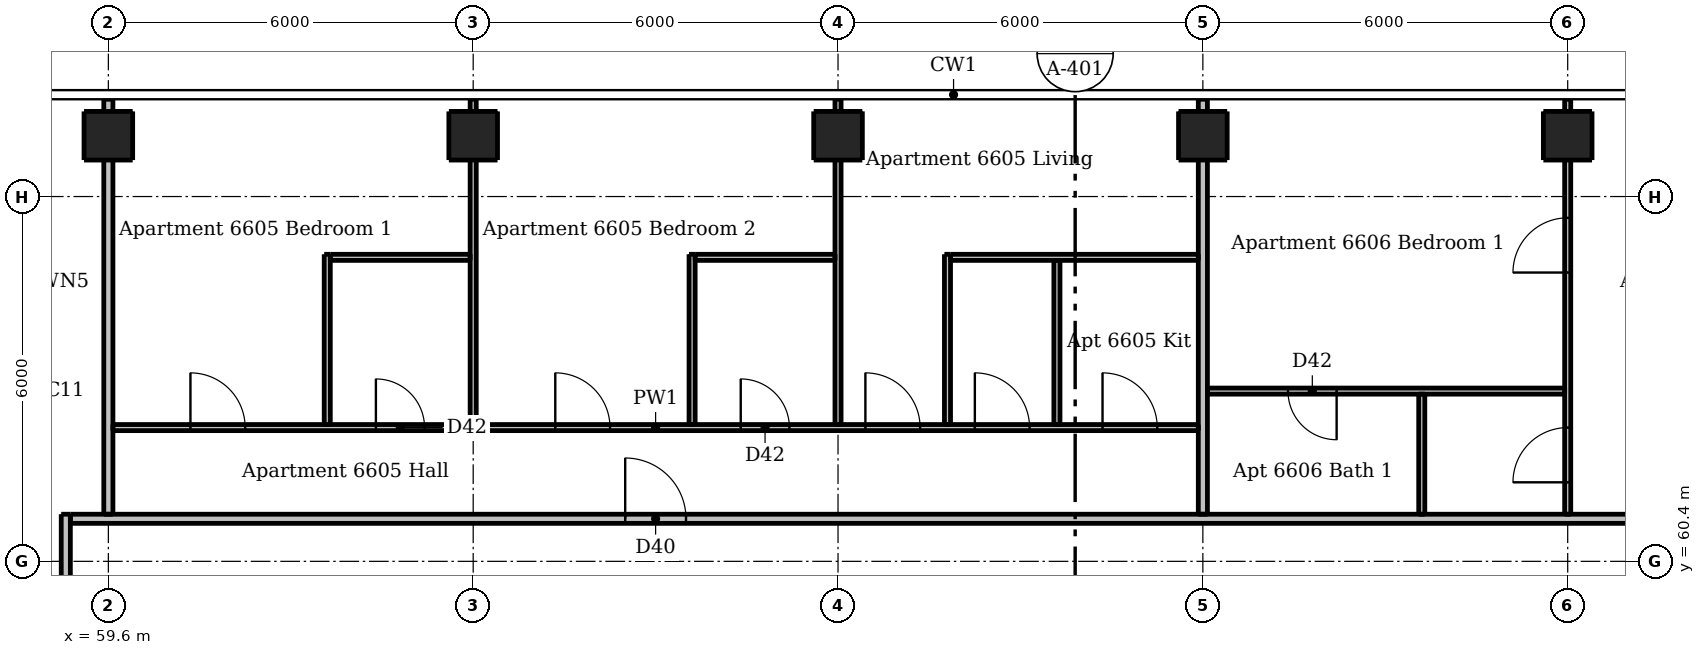
"""IFC4 building model, lengths in metres.
Left out: names, types, materials, properties, quantities, classifications, styles, units other than length and angle.
Written with IfcOpenShell. Run it as: python <this file> out.ifc"""

import sys

from ifc_helpers import new_model, si_unit, direction, frame, frame_2d, origin, origin_2d, place, context, subcontext, project, spatial, rectangle, extrude, element, fill, save


model = new_model("IFC4")
c1 = context("Model", 3, precision=1e-05, world=origin(), true_north=direction((0.0, 1.0)))
c2 = subcontext(c1, "Body", "Model", "MODEL_VIEW")
j1 = project(units=[si_unit("LENGTHUNIT", "METRE"), si_unit("PLANEANGLEUNIT", "RADIAN")], contexts=[c1])
p1 = place(None, origin())
s1 = spatial("IfcSite", under=j1, at=p1, CompositionType="ELEMENT")
p2 = place(p1, origin())
s2 = spatial("IfcBuilding", under=s1, at=p2, CompositionType="ELEMENT")
p3 = place(p2, frame((0.0, 0.0, 248.8)))
s3 = spatial("IfcBuildingStorey", under=s2, at=p3, CompositionType="ELEMENT", Elevation=248.8)
for number, where, z_axis, x_axis in (
    (1, (59.6, 67.4, 0.0), (0.0, 0.0, 1.0), (1.0, 0.0, 0.0)),
    (2, (65.6, 67.4, 0.0), (0.0, 0.0, 1.0), (1.0, 0.0, 0.0)),
    (3, (71.6, 67.4, 0.0), (0.0, 0.0, 1.0), (1.0, 0.0, 0.0)),
    (4, (77.6, 67.4, 0.0), (0.0, 0.0, 1.0), (1.0, 0.0, 0.0)),
    (5, (83.6, 67.4, 0.0), (0.0, 0.0, 1.0), (1.0, 0.0, 0.0)),
):
    element("IfcColumn", number, at=place(p3, frame(where, z_axis=z_axis, x_axis=x_axis)), inside=s3, PredefinedType="COLUMN", context=c2, shape_type="SweptSolid", body=[
        extrude(rectangle(XDim=0.8, YDim=0.8, at=origin_2d()), origin(), (0.0, 0.0, 1.0), 3.05),
    ])
p4 = place(p3, frame((63.2, 62.65, 0.0), z_axis=(0.0, 0.0, 1.0), x_axis=(0.0, 1.0, 0.0)))
e6 = element("IfcWall", 6, at=p4, inside=s3, PredefinedType="PARTITIONING", context=c2, shape_type="SweptSolid", body=[
    extrude(rectangle(XDim=2.8, YDim=0.1, at=frame_2d((1.4, 0.0))), origin(), (0.0, 0.0, 1.0), 3.05),
])
p5 = place(p3, frame((65.6, 62.65, 0.0), z_axis=(0.0, 0.0, 1.0), x_axis=(0.0, 1.0, 0.0)))
e7 = element("IfcWall", 7, at=p5, inside=s3, PredefinedType="PARTITIONING", context=c2, shape_type="SweptSolid", body=[
    extrude(rectangle(XDim=5.35, YDim=0.1, at=frame_2d((2.675, 0.0))), origin(), (0.0, 0.0, 1.0), 2.516),
])
p6 = place(p3, frame((69.2, 62.65, 0.0), z_axis=(0.0, 0.0, 1.0), x_axis=(0.0, 1.0, 0.0)))
e8 = element("IfcWall", 8, at=p6, inside=s3, PredefinedType="PARTITIONING", context=c2, shape_type="SweptSolid", body=[
    extrude(rectangle(XDim=2.8, YDim=0.1, at=frame_2d((1.4, 0.0))), origin(), (0.0, 0.0, 1.0), 3.05),
])
p7 = place(p3, frame((71.6, 62.65, 0.0), z_axis=(0.0, 0.0, 1.0), x_axis=(0.0, 1.0, 0.0)))
e9 = element("IfcWall", 9, at=p7, inside=s3, PredefinedType="PARTITIONING", context=c2, shape_type="SweptSolid", body=[
    extrude(rectangle(XDim=5.35, YDim=0.1, at=frame_2d((2.675, 0.0))), origin(), (0.0, 0.0, 1.0), 2.516),
])
p8 = place(p3, frame((73.4, 62.65, 0.0), z_axis=(0.0, 0.0, 1.0), x_axis=(0.0, 1.0, 0.0)))
e10 = element("IfcWall", 10, at=p8, inside=s3, PredefinedType="PARTITIONING", context=c2, shape_type="SweptSolid", body=[
    extrude(rectangle(XDim=2.8, YDim=0.1, at=frame_2d((1.4, 0.0))), origin(), (0.0, 0.0, 1.0), 3.05),
])
p9 = place(p3, frame((75.2, 62.65, 0.0), z_axis=(0.0, 0.0, 1.0), x_axis=(0.0, 1.0, 0.0)))
e11 = element("IfcWall", 11, at=p9, inside=s3, PredefinedType="PARTITIONING", context=c2, shape_type="SweptSolid", body=[
    extrude(rectangle(XDim=2.7, YDim=0.1, at=frame_2d((1.35, 0.0))), origin(), (0.0, 0.0, 1.0), 3.05),
])
p10 = place(p3, frame((81.2, 61.175, 0.0), z_axis=(0.0, 0.0, 1.0), x_axis=(0.0, 1.0, 0.0)))
e12 = element("IfcWall", 12, at=p10, inside=s3, PredefinedType="PARTITIONING", context=c2, shape_type="SweptSolid", body=[
    extrude(rectangle(XDim=1.975, YDim=0.1, at=frame_2d((0.987, 0.0))), origin(), (0.0, 0.0, 1.0), 3.05),
])
p11 = place(p3, frame((83.6, 61.175, 0.0), z_axis=(0.0, 0.0, 1.0), x_axis=(0.0, 1.0, 0.0)))
e13 = element("IfcWall", 13, at=p11, inside=s3, PredefinedType="PARTITIONING", context=c2, shape_type="SweptSolid", body=[
    extrude(rectangle(XDim=6.825, YDim=0.1, at=frame_2d((3.413, 0.0))), origin(), (0.0, 0.0, 1.0), 2.516),
])
p12 = place(p11, frame((0.525, 0.0, 0.0)))
e14 = element("IfcOpeningElement", 14, at=p12, cuts=e13, PredefinedType="OPENING", context=c2, shape_type="SweptSolid", body=[
    extrude(rectangle(XDim=0.9, YDim=2.1, at=frame_2d((0.45, 1.05))), frame((0.0, 0.06, 0.0), z_axis=(0.0, -1.0, 0.0), x_axis=(1.0, 0.0, 0.0)), (0.0, 0.0, 1.0), 0.12),
])
p13 = place(p11, frame((3.975, 0.0, 0.0)))
e15 = element("IfcOpeningElement", 15, at=p13, cuts=e13, PredefinedType="OPENING", context=c2, shape_type="SweptSolid", body=[
    extrude(rectangle(XDim=0.9, YDim=2.1, at=frame_2d((0.45, 1.05))), frame((0.0, 0.06, 0.0), z_axis=(0.0, -1.0, 0.0), x_axis=(1.0, 0.0, 0.0)), (0.0, 0.0, 1.0), 0.12),
])
for number, where, z_axis, x_axis in (
    (16, (63.25, 65.4, 0.0), (0.0, 0.0, 1.0), (1.0, 0.0, 0.0)),
    (17, (69.25, 65.4, 0.0), (0.0, 0.0, 1.0), (1.0, 0.0, 0.0)),
):
    element("IfcWall", number, at=place(p3, frame(where, z_axis=z_axis, x_axis=x_axis)), inside=s3, PredefinedType="PARTITIONING", context=c2, shape_type="SweptSolid", body=[
        extrude(rectangle(XDim=2.3, YDim=0.1, at=frame_2d((1.15, 0.0))), origin(), (0.0, 0.0, 1.0), 3.05),
    ])
p14 = place(p3, frame((73.45, 65.4, 0.0), z_axis=(0.0, 0.0, 1.0), x_axis=(1.0, 0.0, 0.0)))
e18 = element("IfcWall", 18, at=p14, inside=s3, PredefinedType="PARTITIONING", context=c2, shape_type="SweptSolid", body=[
    extrude(rectangle(XDim=4.075, YDim=0.1, at=frame_2d((2.038, 0.0))), origin(), (0.0, 0.0, 1.0), 3.05),
])
p15 = place(p3, frame((83.55, 63.2, 0.0), z_axis=(0.0, 0.0, 1.0), x_axis=(-1.0, 0.0, 0.0)))
e19 = element("IfcWall", 19, at=p15, inside=s3, PredefinedType="PARTITIONING", context=c2, shape_type="SweptSolid", body=[
    extrude(rectangle(XDim=5.875, YDim=0.1, at=frame_2d((2.938, 0.0))), origin(), (0.0, 0.0, 1.0), 3.05),
])
p16 = place(p15, frame((3.75, 0.0, 0.0)))
e20 = element("IfcOpeningElement", 20, at=p16, cuts=e19, PredefinedType="OPENING", context=c2, shape_type="SweptSolid", body=[
    extrude(rectangle(XDim=0.8, YDim=2.1, at=frame_2d((0.4, 1.05))), frame((0.0, 0.06, 0.0), z_axis=(0.0, -1.0, 0.0), x_axis=(1.0, 0.0, 0.0)), (0.0, 0.0, 1.0), 0.12),
])
p17 = place(p3, frame((59.675, 62.6, 0.0), z_axis=(0.0, 0.0, 1.0), x_axis=(1.0, 0.0, 0.0)))
e21 = element("IfcWall", 21, at=p17, inside=s3, PredefinedType="PARTITIONING", context=c2, shape_type="SweptSolid", body=[
    extrude(rectangle(XDim=17.85, YDim=0.1, at=frame_2d((8.925, 0.0))), origin(), (0.0, 0.0, 1.0), 3.05),
])
p18 = place(p17, frame((12.375, 0.0, 0.0)))
e22 = element("IfcOpeningElement", 22, at=p18, cuts=e21, PredefinedType="OPENING", context=c2, shape_type="SweptSolid", body=[
    extrude(rectangle(XDim=0.9, YDim=2.1, at=frame_2d((0.45, 1.05))), frame((0.0, 0.06, 0.0), z_axis=(0.0, -1.0, 0.0), x_axis=(1.0, 0.0, 0.0)), (0.0, 0.0, 1.0), 0.12),
])
p19 = place(p17, frame((16.275, 0.0, 0.0)))
e23 = element("IfcOpeningElement", 23, at=p19, cuts=e21, PredefinedType="OPENING", context=c2, shape_type="SweptSolid", body=[
    extrude(rectangle(XDim=0.9, YDim=2.1, at=frame_2d((0.45, 1.05))), frame((0.0, 0.06, 0.0), z_axis=(0.0, -1.0, 0.0), x_axis=(1.0, 0.0, 0.0)), (0.0, 0.0, 1.0), 0.12),
])
p20 = place(p17, frame((14.175, 0.0, 0.0)))
e24 = element("IfcOpeningElement", 24, at=p20, cuts=e21, PredefinedType="OPENING", context=c2, shape_type="SweptSolid", body=[
    extrude(rectangle(XDim=0.9, YDim=2.1, at=frame_2d((0.45, 1.05))), frame((0.0, 0.06, 0.0), z_axis=(0.0, -1.0, 0.0), x_axis=(1.0, 0.0, 0.0)), (0.0, 0.0, 1.0), 0.12),
])
p21 = place(p17, frame((1.275, 0.0, 0.0)))
e25 = element("IfcOpeningElement", 25, at=p21, cuts=e21, PredefinedType="OPENING", context=c2, shape_type="SweptSolid", body=[
    extrude(rectangle(XDim=0.9, YDim=2.1, at=frame_2d((0.45, 1.05))), frame((0.0, 0.06, 0.0), z_axis=(0.0, -1.0, 0.0), x_axis=(1.0, 0.0, 0.0)), (0.0, 0.0, 1.0), 0.12),
])
p22 = place(p17, frame((7.275, 0.0, 0.0)))
e26 = element("IfcOpeningElement", 26, at=p22, cuts=e21, PredefinedType="OPENING", context=c2, shape_type="SweptSolid", body=[
    extrude(rectangle(XDim=0.9, YDim=2.1, at=frame_2d((0.45, 1.05))), frame((0.0, 0.06, 0.0), z_axis=(0.0, -1.0, 0.0), x_axis=(1.0, 0.0, 0.0)), (0.0, 0.0, 1.0), 0.12),
])
p23 = place(p17, frame((4.325, 0.0, 0.0)))
e27 = element("IfcOpeningElement", 27, at=p23, cuts=e21, PredefinedType="OPENING", context=c2, shape_type="SweptSolid", body=[
    extrude(rectangle(XDim=0.8, YDim=2.1, at=frame_2d((0.4, 1.05))), frame((0.0, 0.06, 0.0), z_axis=(0.0, -1.0, 0.0), x_axis=(1.0, 0.0, 0.0)), (0.0, 0.0, 1.0), 0.12),
])
p24 = place(p17, frame((10.325, 0.0, 0.0)))
e28 = element("IfcOpeningElement", 28, at=p24, cuts=e21, PredefinedType="OPENING", context=c2, shape_type="SweptSolid", body=[
    extrude(rectangle(XDim=0.8, YDim=2.1, at=frame_2d((0.4, 1.05))), frame((0.0, 0.06, 0.0), z_axis=(0.0, -1.0, 0.0), x_axis=(1.0, 0.0, 0.0)), (0.0, 0.0, 1.0), 0.12),
])
p25 = place(p3, frame((58.9, 30.325, 0.0), z_axis=(0.0, 0.0, 1.0), x_axis=(0.0, 1.0, 0.0)))
e29 = element("IfcWall", 29, at=p25, inside=s3, PredefinedType="PARTITIONING", context=c2, shape_type="SweptSolid", body=[
    extrude(rectangle(XDim=30.85, YDim=0.15, at=frame_2d((15.425, 0.0))), origin(), (0.0, 0.0, 1.0), 3.05),
])
p26 = place(p25, frame((7.375, 0.0, 0.0)))
e30 = element("IfcOpeningElement", 30, at=p26, cuts=e29, PredefinedType="OPENING", context=c2, shape_type="SweptSolid", body=[
    extrude(rectangle(XDim=1.0, YDim=2.1, at=frame_2d((0.5, 1.05))), frame((0.0, 0.085, 0.0), z_axis=(0.0, -1.0, 0.0), x_axis=(1.0, 0.0, 0.0)), (0.0, 0.0, 1.0), 0.17),
])
p27 = place(p25, frame((26.925, 0.0, 0.0)))
e31 = element("IfcOpeningElement", 31, at=p27, cuts=e29, PredefinedType="OPENING", context=c2, shape_type="SweptSolid", body=[
    extrude(rectangle(XDim=1.0, YDim=2.1, at=frame_2d((0.5, 1.05))), frame((0.0, 0.085, 0.0), z_axis=(0.0, -1.0, 0.0), x_axis=(1.0, 0.0, 0.0)), (0.0, 0.0, 1.0), 0.17),
])
p28 = place(p3, frame((59.6, 61.175, 0.0), z_axis=(0.0, 0.0, 1.0), x_axis=(0.0, 1.0, 0.0)))
e32 = element("IfcWall", 32, at=p28, inside=s3, PredefinedType="PARTITIONING", context=c2, shape_type="SweptSolid", body=[
    extrude(rectangle(XDim=6.825, YDim=0.15, at=frame_2d((3.413, 0.0))), origin(), (0.0, 0.0, 1.0), 2.51),
])
p29 = place(p3, frame((77.6, 61.175, 0.0), z_axis=(0.0, 0.0, 1.0), x_axis=(0.0, 1.0, 0.0)))
e33 = element("IfcWall", 33, at=p29, inside=s3, PredefinedType="PARTITIONING", context=c2, shape_type="SweptSolid", body=[
    extrude(rectangle(XDim=6.825, YDim=0.15, at=frame_2d((3.413, 0.0))), origin(), (0.0, 0.0, 1.0), 2.516),
])
p30 = place(p3, frame((58.975, 61.1, 0.0), z_axis=(0.0, 0.0, 1.0), x_axis=(1.0, 0.0, 0.0)))
e34 = element("IfcWall", 34, at=p30, inside=s3, PredefinedType="PARTITIONING", context=c2, shape_type="SweptSolid", body=[
    extrude(rectangle(XDim=29.25, YDim=0.15, at=frame_2d((14.625, 0.0))), origin(), (0.0, 0.0, 1.0), 3.05),
])
p31 = place(p30, frame((9.125, 0.0, 0.0)))
e35 = element("IfcOpeningElement", 35, at=p31, cuts=e34, PredefinedType="OPENING", context=c2, shape_type="SweptSolid", body=[
    extrude(rectangle(XDim=1.0, YDim=2.1, at=frame_2d((0.5, 1.05))), frame((0.0, 0.085, 0.0), z_axis=(0.0, -1.0, 0.0), x_axis=(1.0, 0.0, 0.0)), (0.0, 0.0, 1.0), 0.17),
])
p32 = place(p30, frame((26.475, 0.0, 0.0)))
e36 = element("IfcOpeningElement", 36, at=p32, cuts=e34, PredefinedType="OPENING", context=c2, shape_type="SweptSolid", body=[
    extrude(rectangle(XDim=1.0, YDim=2.1, at=frame_2d((0.5, 1.05))), frame((0.0, 0.085, 0.0), z_axis=(0.0, -1.0, 0.0), x_axis=(1.0, 0.0, 0.0)), (0.0, 0.0, 1.0), 0.17),
])
p33 = place(p31, origin())
e37 = element("IfcDoor", 37, at=p33, inside=s3, OperationType="SINGLE_SWING_LEFT", PredefinedType="DOOR", context=c2, shape_type="SweptSolid", body=[
    extrude(rectangle(XDim=1.0, YDim=2.1, at=frame_2d((0.5, 1.05))), frame((0.0, 0.025, 0.0), z_axis=(0.0, -1.0, 0.0), x_axis=(1.0, 0.0, 0.0)), (0.0, 0.0, 1.0), 0.05),
])
fill(e35, e37)
p34 = place(p18, origin())
e38 = element("IfcDoor", 38, at=p34, inside=s3, OperationType="SINGLE_SWING_LEFT", PredefinedType="DOOR", context=c2, shape_type="SweptSolid", body=[
    extrude(rectangle(XDim=0.9, YDim=2.1, at=frame_2d((0.45, 1.05))), frame((0.0, 0.025, 0.0), z_axis=(0.0, -1.0, 0.0), x_axis=(1.0, 0.0, 0.0)), (0.0, 0.0, 1.0), 0.05),
])
fill(e22, e38)
p35 = place(p19, origin())
e39 = element("IfcDoor", 39, at=p35, inside=s3, OperationType="SINGLE_SWING_LEFT", PredefinedType="DOOR", context=c2, shape_type="SweptSolid", body=[
    extrude(rectangle(XDim=0.9, YDim=2.1, at=frame_2d((0.45, 1.05))), frame((0.0, 0.025, 0.0), z_axis=(0.0, -1.0, 0.0), x_axis=(1.0, 0.0, 0.0)), (0.0, 0.0, 1.0), 0.05),
])
fill(e23, e39)
p36 = place(p20, origin())
e40 = element("IfcDoor", 40, at=p36, inside=s3, OperationType="SINGLE_SWING_LEFT", PredefinedType="DOOR", context=c2, shape_type="SweptSolid", body=[
    extrude(rectangle(XDim=0.9, YDim=2.1, at=frame_2d((0.45, 1.05))), frame((0.0, 0.025, 0.0), z_axis=(0.0, -1.0, 0.0), x_axis=(1.0, 0.0, 0.0)), (0.0, 0.0, 1.0), 0.05),
])
fill(e24, e40)
p37 = place(p21, origin())
e41 = element("IfcDoor", 41, at=p37, inside=s3, OperationType="SINGLE_SWING_LEFT", PredefinedType="DOOR", context=c2, shape_type="SweptSolid", body=[
    extrude(rectangle(XDim=0.9, YDim=2.1, at=frame_2d((0.45, 1.05))), frame((0.0, 0.025, 0.0), z_axis=(0.0, -1.0, 0.0), x_axis=(1.0, 0.0, 0.0)), (0.0, 0.0, 1.0), 0.05),
])
fill(e25, e41)
p38 = place(p22, origin())
e42 = element("IfcDoor", 42, at=p38, inside=s3, OperationType="SINGLE_SWING_LEFT", PredefinedType="DOOR", context=c2, shape_type="SweptSolid", body=[
    extrude(rectangle(XDim=0.9, YDim=2.1, at=frame_2d((0.45, 1.05))), frame((0.0, 0.025, 0.0), z_axis=(0.0, -1.0, 0.0), x_axis=(1.0, 0.0, 0.0)), (0.0, 0.0, 1.0), 0.05),
])
fill(e26, e42)
p39 = place(p23, origin())
e43 = element("IfcDoor", 43, at=p39, inside=s3, OperationType="SINGLE_SWING_LEFT", PredefinedType="DOOR", context=c2, shape_type="SweptSolid", body=[
    extrude(rectangle(XDim=0.8, YDim=2.1, at=frame_2d((0.4, 1.05))), frame((0.0, 0.025, 0.0), z_axis=(0.0, -1.0, 0.0), x_axis=(1.0, 0.0, 0.0)), (0.0, 0.0, 1.0), 0.05),
])
fill(e27, e43)
p40 = place(p24, origin())
e44 = element("IfcDoor", 44, at=p40, inside=s3, OperationType="SINGLE_SWING_LEFT", PredefinedType="DOOR", context=c2, shape_type="SweptSolid", body=[
    extrude(rectangle(XDim=0.8, YDim=2.1, at=frame_2d((0.4, 1.05))), frame((0.0, 0.025, 0.0), z_axis=(0.0, -1.0, 0.0), x_axis=(1.0, 0.0, 0.0)), (0.0, 0.0, 1.0), 0.05),
])
fill(e28, e44)
p41 = place(p12, origin())
e45 = element("IfcDoor", 45, at=p41, inside=s3, OperationType="SINGLE_SWING_LEFT", PredefinedType="DOOR", context=c2, shape_type="SweptSolid", body=[
    extrude(rectangle(XDim=0.9, YDim=2.1, at=frame_2d((0.45, 1.05))), frame((0.0, 0.025, 0.0), z_axis=(0.0, -1.0, 0.0), x_axis=(1.0, 0.0, 0.0)), (0.0, 0.0, 1.0), 0.05),
])
fill(e14, e45)
p42 = place(p13, origin())
e46 = element("IfcDoor", 46, at=p42, inside=s3, OperationType="SINGLE_SWING_LEFT", PredefinedType="DOOR", context=c2, shape_type="SweptSolid", body=[
    extrude(rectangle(XDim=0.9, YDim=2.1, at=frame_2d((0.45, 1.05))), frame((0.0, 0.025, 0.0), z_axis=(0.0, -1.0, 0.0), x_axis=(1.0, 0.0, 0.0)), (0.0, 0.0, 1.0), 0.05),
])
fill(e15, e46)
p43 = place(p16, origin())
e47 = element("IfcDoor", 47, at=p43, inside=s3, OperationType="SINGLE_SWING_LEFT", PredefinedType="DOOR", context=c2, shape_type="SweptSolid", body=[
    extrude(rectangle(XDim=0.8, YDim=2.1, at=frame_2d((0.4, 1.05))), frame((0.0, 0.025, 0.0), z_axis=(0.0, -1.0, 0.0), x_axis=(1.0, 0.0, 0.0)), (0.0, 0.0, 1.0), 0.05),
])
fill(e20, e47)
save(model, sys.argv[1])
